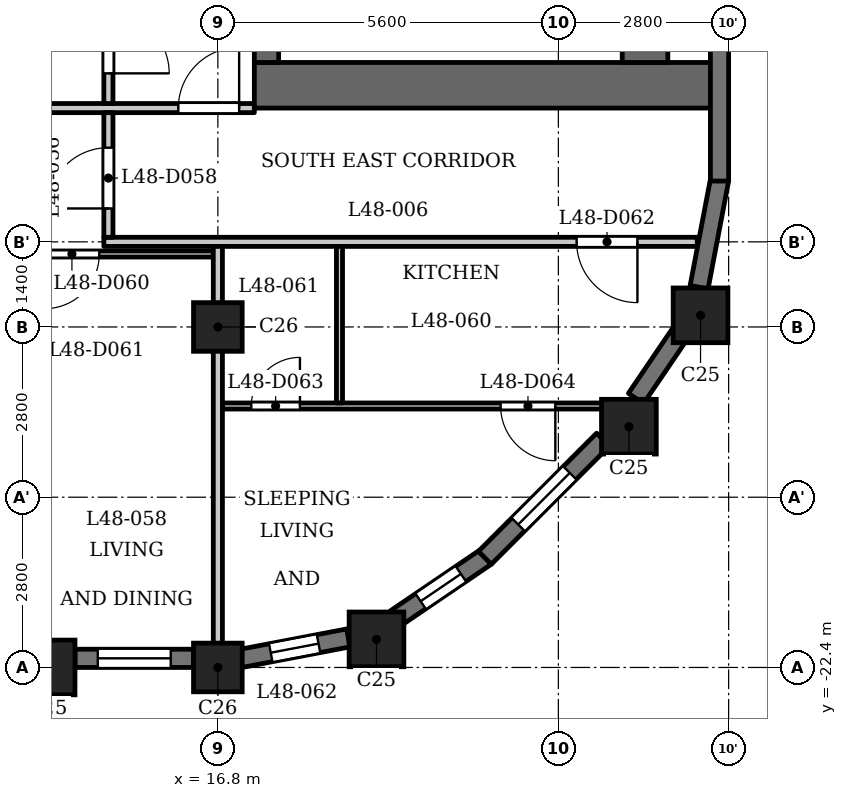
"""IFC4 building model, lengths in metres.
Left out: names, types, materials, properties, quantities, classifications, styles, units other than length and angle.
Written with IfcOpenShell. Run it as: python <this file> out.ifc"""

import sys

from ifc_helpers import new_model, si_unit, direction, frame, frame_2d, origin, origin_2d, place, context, subcontext, project, spatial, rectangle, extrude, element, fill, save


model = new_model("IFC4")
c1 = context("Model", 3, precision=1e-05, world=origin(), true_north=direction((0.0, 1.0)))
c2 = subcontext(c1, "Body", "Model", "MODEL_VIEW")
j1 = project(units=[si_unit("LENGTHUNIT", "METRE"), si_unit("PLANEANGLEUNIT", "RADIAN")], contexts=[c1])
p1 = place(None, origin())
s1 = spatial("IfcSite", under=j1, at=p1, CompositionType="ELEMENT")
p2 = place(p1, origin())
s2 = spatial("IfcBuilding", under=s1, at=p2, CompositionType="ELEMENT")
p3 = place(p2, frame((0.0, 0.0, 188.9)))
s3 = spatial("IfcBuildingStorey", under=s2, at=p3, CompositionType="ELEMENT", Elevation=188.9)
for number, where, z_axis, x_axis in (
    (1, (14.0, -22.4, 0.0), (0.0, 0.0, 1.0), (1.0, 0.0, 0.0)),
    (2, (19.409, -21.938, 0.0), (0.0, 0.0, 1.0), (1.0, 0.0, 0.0)),
    (3, (23.56, -18.44, 0.0), (0.0, 0.0, 1.0), (1.0, 0.0, 0.0)),
    (4, (24.738, -16.609, 0.0), (0.0, 0.0, 1.0), (1.0, 0.0, 0.0)),
):
    element("IfcColumn", number, at=place(p3, frame(where, z_axis=z_axis, x_axis=x_axis)), inside=s3, PredefinedType="COLUMN", context=c2, shape_type="SweptSolid", body=[
        extrude(rectangle(XDim=0.9, YDim=0.9, at=origin_2d()), origin(), (0.0, 0.0, 1.0), 3.5),
    ])
for number, where, z_axis, x_axis in (
    (5, (16.8, -22.4, 0.0), (0.0, 0.0, 1.0), (1.0, 0.0, 0.0)),
    (6, (16.8, -16.8, 0.0), (0.0, 0.0, 1.0), (1.0, 0.0, 0.0)),
):
    element("IfcColumn", number, at=place(p3, frame(where, z_axis=z_axis, x_axis=x_axis)), inside=s3, PredefinedType="COLUMN", context=c2, shape_type="SweptSolid", body=[
        extrude(rectangle(XDim=0.8, YDim=0.8, at=origin_2d()), origin(), (0.0, 0.0, 1.0), 3.5),
    ])
p4 = place(p3, frame((14.45, -22.25, 0.0), z_axis=(0.0, 0.0, 1.0), x_axis=(1.0, 0.0, 0.0)))
e7 = element("IfcWall", 7, at=p4, inside=s3, PredefinedType="SOLIDWALL", context=c2, shape_type="SweptSolid", body=[
    extrude(rectangle(XDim=1.95, YDim=0.3, at=frame_2d((0.975, 0.0))), origin(), (0.0, 0.0, 1.0), 2.5),
])
p5 = place(p4, frame((0.375, 0.0, 0.6)))
e8 = element("IfcOpeningElement", 8, at=p5, cuts=e7, PredefinedType="OPENING", context=c2, shape_type="SweptSolid", body=[
    extrude(rectangle(XDim=1.2, YDim=1.55, at=frame_2d((0.6, 0.775))), frame((0.0, 0.16, 0.0), z_axis=(0.0, -1.0, 0.0), x_axis=(1.0, 0.0, 0.0)), (0.0, 0.0, 1.0), 0.32),
])
p6 = place(p3, frame((17.179, -22.251, 0.0), z_axis=(0.0, 0.0, 1.0), x_axis=(0.98230529033, 0.187286722942, 0.0)))
e9 = element("IfcWall", 9, at=p6, inside=s3, PredefinedType="SOLIDWALL", context=c2, shape_type="SweptSolid", body=[
    extrude(rectangle(XDim=1.799, YDim=0.3, at=frame_2d((0.899, 0.0))), origin(), (0.0, 0.0, 1.0), 2.5),
])
p7 = place(p6, frame((0.5, 0.0, 0.6)))
e10 = element("IfcOpeningElement", 10, at=p7, cuts=e9, PredefinedType="OPENING", context=c2, shape_type="SweptSolid", body=[
    extrude(rectangle(XDim=0.8, YDim=1.55, at=frame_2d((0.4, 0.775))), frame((0.0, 0.16, 0.0), z_axis=(0.0, -1.0, 0.0), x_axis=(1.0, 0.0, 0.0)), (0.0, 0.0, 1.0), 0.32),
])
p8 = place(p3, frame((19.719, -21.594, 0.0), z_axis=(0.0, 0.0, 1.0), x_axis=(0.827067282455, 0.562102935673, 0.0)))
e11 = element("IfcWall", 11, at=p8, inside=s3, PredefinedType="SOLIDWALL", context=c2, shape_type="SweptSolid", body=[
    extrude(rectangle(XDim=1.806, YDim=0.3, at=frame_2d((0.903, 0.0))), origin(), (0.0, 0.0, 1.0), 2.5),
])
p9 = place(p8, frame((0.503, 0.0, 0.6)))
e12 = element("IfcOpeningElement", 12, at=p9, cuts=e11, PredefinedType="OPENING", context=c2, shape_type="SweptSolid", body=[
    extrude(rectangle(XDim=0.8, YDim=1.55, at=frame_2d((0.4, 0.775))), frame((0.0, 0.16, 0.0), z_axis=(0.0, -1.0, 0.0), x_axis=(1.0, 0.0, 0.0)), (0.0, 0.0, 1.0), 0.32),
])
p10 = place(p3, frame((21.191, -20.597, 0.0), z_axis=(0.0, 0.0, 1.0), x_axis=(0.707106781187, 0.707106781187, 0.0)))
e13 = element("IfcWall", 13, at=p10, inside=s3, PredefinedType="SOLIDWALL", context=c2, shape_type="SweptSolid", body=[
    extrude(rectangle(XDim=2.75, YDim=0.3, at=frame_2d((1.375, 0.0))), origin(), (0.0, 0.0, 1.0), 2.5),
])
p11 = place(p10, frame((0.775, 0.0, 0.6)))
e14 = element("IfcOpeningElement", 14, at=p11, cuts=e13, PredefinedType="OPENING", context=c2, shape_type="SweptSolid", body=[
    extrude(rectangle(XDim=1.2, YDim=1.55, at=frame_2d((0.6, 0.775))), frame((0.0, 0.16, 0.0), z_axis=(0.0, -1.0, 0.0), x_axis=(1.0, 0.0, 0.0)), (0.0, 0.0, 1.0), 0.32),
])
p12 = place(p3, frame((23.676, -17.975, 0.0), z_axis=(0.0, 0.0, 1.0), x_axis=(0.56200149592, 0.827136215253, 0.0)))
e15 = element("IfcWall", 15, at=p12, inside=s3, PredefinedType="SOLIDWALL", context=c2, shape_type="SweptSolid", body=[
    extrude(rectangle(XDim=1.277, YDim=0.3, at=frame_2d((0.639, 0.0))), origin(), (0.0, 0.0, 1.0), 2.5),
])
p13 = place(p3, frame((24.714, -16.146, 0.0), z_axis=(0.0, 0.0, 1.0), x_axis=(0.187348135549, 0.982293579388, 0.0)))
e16 = element("IfcWall", 16, at=p13, inside=s3, PredefinedType="SOLIDWALL", context=c2, shape_type="SweptSolid", body=[
    extrude(rectangle(XDim=1.806, YDim=0.3, at=frame_2d((0.903, 0.0))), origin(), (0.0, 0.0, 1.0), 2.5),
])
p14 = place(p3, frame((25.05, -14.4, 0.0), z_axis=(0.0, 0.0, 1.0), x_axis=(0.0, 1.0, 0.0)))
e17 = element("IfcWall", 17, at=p14, inside=s3, PredefinedType="SOLIDWALL", context=c2, shape_type="SweptSolid", body=[
    extrude(rectangle(XDim=2.75, YDim=0.3, at=frame_2d((1.375, 0.0))), origin(), (0.0, 0.0, 1.0), 2.5),
])
p15 = place(p3, frame((17.4, -12.825, 0.0), z_axis=(0.0, 0.0, 1.0), x_axis=(1.0, 0.0, 0.0)))
e18 = element("IfcWall", 18, at=p15, inside=s3, PredefinedType="SHEAR", context=c2, shape_type="SweptSolid", body=[
    extrude(rectangle(XDim=7.6, YDim=0.75, at=frame_2d((3.8, 0.0))), origin(), (0.0, 0.0, 1.0), 3.2),
])
p16 = place(p3, frame((17.6, -12.45, 0.0), z_axis=(0.0, 0.0, 1.0), x_axis=(0.0, 1.0, 0.0)))
e19 = element("IfcWall", 19, at=p16, inside=s3, PredefinedType="SHEAR", context=c2, shape_type="SweptSolid", body=[
    extrude(rectangle(XDim=24.9, YDim=0.4, at=frame_2d((12.45, 0.0))), origin(), (0.0, 0.0, 1.0), 3.2),
])
p17 = place(p16, frame((6.325, 0.0, 0.0)))
e20 = element("IfcOpeningElement", 20, at=p17, cuts=e19, PredefinedType="OPENING", context=c2, shape_type="SweptSolid", body=[
    extrude(rectangle(XDim=0.9, YDim=2.1, at=frame_2d((0.45, 1.05))), frame((0.0, 0.21, 0.0), z_axis=(0.0, -1.0, 0.0), x_axis=(1.0, 0.0, 0.0)), (0.0, 0.0, 1.0), 0.42),
])
p18 = place(p16, frame((9.925, 0.0, 0.0)))
e21 = element("IfcOpeningElement", 21, at=p18, cuts=e19, PredefinedType="OPENING", context=c2, shape_type="SweptSolid", body=[
    extrude(rectangle(XDim=0.9, YDim=2.1, at=frame_2d((0.45, 1.05))), frame((0.0, 0.21, 0.0), z_axis=(0.0, -1.0, 0.0), x_axis=(1.0, 0.0, 0.0)), (0.0, 0.0, 1.0), 0.42),
])
p19 = place(p16, frame((15.6, 0.0, 0.0)))
e22 = element("IfcOpeningElement", 22, at=p19, cuts=e19, PredefinedType="OPENING", context=c2, shape_type="SweptSolid", body=[
    extrude(rectangle(XDim=1.1, YDim=2.1, at=frame_2d((0.55, 1.05))), frame((0.0, 0.21, 0.0), z_axis=(0.0, -1.0, 0.0), x_axis=(1.0, 0.0, 0.0)), (0.0, 0.0, 1.0), 0.42),
])
p20 = place(p16, frame((18.0, 0.0, 0.0)))
e23 = element("IfcOpeningElement", 23, at=p20, cuts=e19, PredefinedType="OPENING", context=c2, shape_type="SweptSolid", body=[
    extrude(rectangle(XDim=1.1, YDim=2.1, at=frame_2d((0.55, 1.05))), frame((0.0, 0.21, 0.0), z_axis=(0.0, -1.0, 0.0), x_axis=(1.0, 0.0, 0.0)), (0.0, 0.0, 1.0), 0.42),
])
p21 = place(p16, frame((23.025, 0.0, 0.0)))
e24 = element("IfcOpeningElement", 24, at=p21, cuts=e19, PredefinedType="OPENING", context=c2, shape_type="SweptSolid", body=[
    extrude(rectangle(XDim=1.1, YDim=2.1, at=frame_2d((0.55, 1.05))), frame((0.0, 0.21, 0.0), z_axis=(0.0, -1.0, 0.0), x_axis=(1.0, 0.0, 0.0)), (0.0, 0.0, 1.0), 0.42),
])
p22 = place(p16, frame((0.775, 0.0, 0.0)))
e25 = element("IfcOpeningElement", 25, at=p22, cuts=e19, PredefinedType="OPENING", context=c2, shape_type="SweptSolid", body=[
    extrude(rectangle(XDim=1.1, YDim=2.1, at=frame_2d((0.55, 1.05))), frame((0.0, 0.21, 0.0), z_axis=(0.0, -1.0, 0.0), x_axis=(1.0, 0.0, 0.0)), (0.0, 0.0, 1.0), 0.42),
])
p23 = place(p16, frame((12.925, 0.0, 0.0)))
e26 = element("IfcOpeningElement", 26, at=p23, cuts=e19, PredefinedType="OPENING", context=c2, shape_type="SweptSolid", body=[
    extrude(rectangle(XDim=1.8, YDim=2.1, at=frame_2d((0.9, 1.05))), frame((0.0, 0.21, 0.0), z_axis=(0.0, -1.0, 0.0), x_axis=(1.0, 0.0, 0.0)), (0.0, 0.0, 1.0), 0.42),
])
p24 = place(p3, frame((23.825, -12.45, 0.0), z_axis=(0.0, 0.0, 1.0), x_axis=(0.0, 1.0, 0.0)))
e27 = element("IfcWall", 27, at=p24, inside=s3, PredefinedType="SHEAR", context=c2, shape_type="SweptSolid", body=[
    extrude(rectangle(XDim=24.9, YDim=0.75, at=frame_2d((12.45, 0.0))), origin(), (0.0, 0.0, 1.0), 3.2),
])
p25 = place(p3, frame((16.875, -18.1, 0.0), z_axis=(0.0, 0.0, 1.0), x_axis=(1.0, 0.0, 0.0)))
e28 = element("IfcWall", 28, at=p25, inside=s3, PredefinedType="PARTITIONING", context=c2, shape_type="SweptSolid", body=[
    extrude(rectangle(XDim=6.765, YDim=0.1, at=frame_2d((3.382, 0.0))), origin(), (0.0, 0.0, 1.0), 3.2),
])
p26 = place(p25, frame((0.475, 0.0, 0.0)))
e29 = element("IfcOpeningElement", 29, at=p26, cuts=e28, PredefinedType="OPENING", context=c2, shape_type="SweptSolid", body=[
    extrude(rectangle(XDim=0.8, YDim=2.1, at=frame_2d((0.4, 1.05))), frame((0.0, 0.06, 0.0), z_axis=(0.0, -1.0, 0.0), x_axis=(1.0, 0.0, 0.0)), (0.0, 0.0, 1.0), 0.12),
])
p27 = place(p25, frame((4.575, 0.0, 0.0)))
e30 = element("IfcOpeningElement", 30, at=p27, cuts=e28, PredefinedType="OPENING", context=c2, shape_type="SweptSolid", body=[
    extrude(rectangle(XDim=0.9, YDim=2.1, at=frame_2d((0.45, 1.05))), frame((0.0, 0.06, 0.0), z_axis=(0.0, -1.0, 0.0), x_axis=(1.0, 0.0, 0.0)), (0.0, 0.0, 1.0), 0.12),
])
p28 = place(p3, frame((-16.725, -15.6, 0.0), z_axis=(0.0, 0.0, 1.0), x_axis=(1.0, 0.0, 0.0)))
e31 = element("IfcWall", 31, at=p28, inside=s3, PredefinedType="PARTITIONING", context=c2, shape_type="SweptSolid", body=[
    extrude(rectangle(XDim=33.45, YDim=0.1, at=frame_2d((16.725, 0.0))), origin(), (0.0, 0.0, 1.0), 3.2),
])
p29 = place(p28, frame((4.075, 0.0, 0.0)))
e32 = element("IfcOpeningElement", 32, at=p29, cuts=e31, PredefinedType="OPENING", context=c2, shape_type="SweptSolid", body=[
    extrude(rectangle(XDim=0.8, YDim=2.1, at=frame_2d((0.4, 1.05))), frame((0.0, 0.06, 0.0), z_axis=(0.0, -1.0, 0.0), x_axis=(1.0, 0.0, 0.0)), (0.0, 0.0, 1.0), 0.12),
])
p30 = place(p28, frame((1.825, 0.0, 0.0)))
e33 = element("IfcOpeningElement", 33, at=p30, cuts=e31, PredefinedType="OPENING", context=c2, shape_type="SweptSolid", body=[
    extrude(rectangle(XDim=0.9, YDim=2.1, at=frame_2d((0.45, 1.05))), frame((0.0, 0.06, 0.0), z_axis=(0.0, -1.0, 0.0), x_axis=(1.0, 0.0, 0.0)), (0.0, 0.0, 1.0), 0.12),
])
p31 = place(p28, frame((9.675, 0.0, 0.0)))
e34 = element("IfcOpeningElement", 34, at=p31, cuts=e31, PredefinedType="OPENING", context=c2, shape_type="SweptSolid", body=[
    extrude(rectangle(XDim=0.8, YDim=2.1, at=frame_2d((0.4, 1.05))), frame((0.0, 0.06, 0.0), z_axis=(0.0, -1.0, 0.0), x_axis=(1.0, 0.0, 0.0)), (0.0, 0.0, 1.0), 0.12),
])
p32 = place(p28, frame((14.025, 0.0, 0.0)))
e35 = element("IfcOpeningElement", 35, at=p32, cuts=e31, PredefinedType="OPENING", context=c2, shape_type="SweptSolid", body=[
    extrude(rectangle(XDim=0.9, YDim=2.1, at=frame_2d((0.45, 1.05))), frame((0.0, 0.06, 0.0), z_axis=(0.0, -1.0, 0.0), x_axis=(1.0, 0.0, 0.0)), (0.0, 0.0, 1.0), 0.12),
])
p33 = place(p28, frame((20.875, 0.0, 0.0)))
e36 = element("IfcOpeningElement", 36, at=p33, cuts=e31, PredefinedType="OPENING", context=c2, shape_type="SweptSolid", body=[
    extrude(rectangle(XDim=0.8, YDim=2.1, at=frame_2d((0.4, 1.05))), frame((0.0, 0.06, 0.0), z_axis=(0.0, -1.0, 0.0), x_axis=(1.0, 0.0, 0.0)), (0.0, 0.0, 1.0), 0.12),
])
p34 = place(p28, frame((25.225, 0.0, 0.0)))
e37 = element("IfcOpeningElement", 37, at=p34, cuts=e31, PredefinedType="OPENING", context=c2, shape_type="SweptSolid", body=[
    extrude(rectangle(XDim=0.9, YDim=2.1, at=frame_2d((0.45, 1.05))), frame((0.0, 0.06, 0.0), z_axis=(0.0, -1.0, 0.0), x_axis=(1.0, 0.0, 0.0)), (0.0, 0.0, 1.0), 0.12),
])
p35 = place(p28, frame((28.475, 0.0, 0.0)))
e38 = element("IfcOpeningElement", 38, at=p35, cuts=e31, PredefinedType="OPENING", context=c2, shape_type="SweptSolid", body=[
    extrude(rectangle(XDim=0.8, YDim=2.1, at=frame_2d((0.4, 1.05))), frame((0.0, 0.06, 0.0), z_axis=(0.0, -1.0, 0.0), x_axis=(1.0, 0.0, 0.0)), (0.0, 0.0, 1.0), 0.12),
])
p36 = place(p28, frame((30.675, 0.0, 0.0)))
e39 = element("IfcOpeningElement", 39, at=p36, cuts=e31, PredefinedType="OPENING", context=c2, shape_type="SweptSolid", body=[
    extrude(rectangle(XDim=0.9, YDim=2.1, at=frame_2d((0.45, 1.05))), frame((0.0, 0.06, 0.0), z_axis=(0.0, -1.0, 0.0), x_axis=(1.0, 0.0, 0.0)), (0.0, 0.0, 1.0), 0.12),
])
p37 = place(p3, frame((14.925, -15.4, 0.0), z_axis=(0.0, 0.0, 1.0), x_axis=(1.0, 0.0, 0.0)))
e40 = element("IfcWall", 40, at=p37, inside=s3, PredefinedType="PARTITIONING", context=c2, shape_type="SweptSolid", body=[
    extrude(rectangle(XDim=9.759, YDim=0.15, at=frame_2d((4.879, 0.0))), origin(), (0.0, 0.0, 1.0), 3.2),
])
p38 = place(p37, frame((7.775, 0.0, 0.0)))
e41 = element("IfcOpeningElement", 41, at=p38, cuts=e40, PredefinedType="OPENING", context=c2, shape_type="SweptSolid", body=[
    extrude(rectangle(XDim=1.0, YDim=2.1, at=frame_2d((0.5, 1.05))), frame((0.0, 0.085, 0.0), z_axis=(0.0, -1.0, 0.0), x_axis=(1.0, 0.0, 0.0)), (0.0, 0.0, 1.0), 0.17),
])
p39 = place(p3, frame((-17.4, -13.2, 0.0), z_axis=(0.0, 0.0, 1.0), x_axis=(1.0, 0.0, 0.0)))
e42 = element("IfcWall", 42, at=p39, inside=s3, PredefinedType="PARTITIONING", context=c2, shape_type="SweptSolid", body=[
    extrude(rectangle(XDim=34.8, YDim=0.15, at=frame_2d((17.4, 0.0))), origin(), (0.0, 0.0, 1.0), 3.2),
])
p40 = place(p39, frame((0.15, 0.0, 0.0)))
e43 = element("IfcOpeningElement", 43, at=p40, cuts=e42, PredefinedType="OPENING", context=c2, shape_type="SweptSolid", body=[
    extrude(rectangle(XDim=1.0, YDim=2.1, at=frame_2d((0.5, 1.05))), frame((0.0, 0.085, 0.0), z_axis=(0.0, -1.0, 0.0), x_axis=(1.0, 0.0, 0.0)), (0.0, 0.0, 1.0), 0.17),
])
p41 = place(p39, frame((33.55, 0.0, 0.0)))
e44 = element("IfcOpeningElement", 44, at=p41, cuts=e42, PredefinedType="OPENING", context=c2, shape_type="SweptSolid", body=[
    extrude(rectangle(XDim=1.0, YDim=2.1, at=frame_2d((0.5, 1.05))), frame((0.0, 0.085, 0.0), z_axis=(0.0, -1.0, 0.0), x_axis=(1.0, 0.0, 0.0)), (0.0, 0.0, 1.0), 0.17),
])
p42 = place(p39, frame((15.7, 0.0, 0.0)))
e45 = element("IfcOpeningElement", 45, at=p42, cuts=e42, PredefinedType="OPENING", context=c2, shape_type="SweptSolid", body=[
    extrude(rectangle(XDim=1.0, YDim=2.1, at=frame_2d((0.5, 1.05))), frame((0.0, 0.085, 0.0), z_axis=(0.0, -1.0, 0.0), x_axis=(1.0, 0.0, 0.0)), (0.0, 0.0, 1.0), 0.17),
])
p43 = place(p39, frame((26.9, 0.0, 0.0)))
e46 = element("IfcOpeningElement", 46, at=p43, cuts=e42, PredefinedType="OPENING", context=c2, shape_type="SweptSolid", body=[
    extrude(rectangle(XDim=1.0, YDim=2.1, at=frame_2d((0.5, 1.05))), frame((0.0, 0.085, 0.0), z_axis=(0.0, -1.0, 0.0), x_axis=(1.0, 0.0, 0.0)), (0.0, 0.0, 1.0), 0.17),
])
p44 = place(p3, frame((15.0, -15.325, 0.0), z_axis=(0.0, 0.0, 1.0), x_axis=(0.0, 1.0, 0.0)))
e47 = element("IfcWall", 47, at=p44, inside=s3, PredefinedType="PARTITIONING", context=c2, shape_type="SweptSolid", body=[
    extrude(rectangle(XDim=2.05, YDim=0.15, at=frame_2d((1.025, 0.0))), origin(), (0.0, 0.0, 1.0), 3.2),
])
p45 = place(p44, frame((0.474, 0.0, 0.0)))
e48 = element("IfcOpeningElement", 48, at=p45, cuts=e47, PredefinedType="OPENING", context=c2, shape_type="SweptSolid", body=[
    extrude(rectangle(XDim=1.0, YDim=2.1, at=frame_2d((0.5, 1.05))), frame((0.0, 0.085, 0.0), z_axis=(0.0, -1.0, 0.0), x_axis=(1.0, 0.0, 0.0)), (0.0, 0.0, 1.0), 0.17),
])
p46 = place(p3, frame((15.0, -13.125, 0.0), z_axis=(0.0, 0.0, 1.0), x_axis=(0.0, 1.0, 0.0)))
e49 = element("IfcWall", 49, at=p46, inside=s3, PredefinedType="PARTITIONING", context=c2, shape_type="SweptSolid", body=[
    extrude(rectangle(XDim=6.356, YDim=0.15, at=frame_2d((3.178, 0.0))), origin(), (0.0, 0.0, 1.0), 3.2),
])
p47 = place(p46, frame((0.496, 0.0, 0.0)))
e50 = element("IfcOpeningElement", 50, at=p47, cuts=e49, PredefinedType="OPENING", context=c2, shape_type="SweptSolid", body=[
    extrude(rectangle(XDim=1.0, YDim=2.1, at=frame_2d((0.5, 1.05))), frame((0.0, 0.085, 0.0), z_axis=(0.0, -1.0, 0.0), x_axis=(1.0, 0.0, 0.0)), (0.0, 0.0, 1.0), 0.17),
])
p48 = place(p3, frame((16.8, -22.31, 0.0), z_axis=(0.0, 0.0, 1.0), x_axis=(0.0, 1.0, 0.0)))
e51 = element("IfcWall", 51, at=p48, inside=s3, PredefinedType="PARTITIONING", context=c2, shape_type="SweptSolid", body=[
    extrude(rectangle(XDim=6.835, YDim=0.15, at=frame_2d((3.417, 0.0))), origin(), (0.0, 0.0, 1.0), 2.55),
])
p49 = place(p3, frame((18.8, -18.05, 0.0), z_axis=(0.0, 0.0, 1.0), x_axis=(0.0, 1.0, 0.0)))
e52 = element("IfcWall", 52, at=p49, inside=s3, PredefinedType="PARTITIONING", context=c2, shape_type="SweptSolid", body=[
    extrude(rectangle(XDim=2.575, YDim=0.1, at=frame_2d((1.288, 0.0))), origin(), (0.0, 0.0, 1.0), 3.2),
])
p50 = place(p47, origin())
e53 = element("IfcDoor", 53, at=p50, inside=s3, OperationType="SINGLE_SWING_LEFT", PredefinedType="DOOR", context=c2, shape_type="SweptSolid", body=[
    extrude(rectangle(XDim=1.0, YDim=2.1, at=frame_2d((0.5, 1.05))), frame((0.0, 0.025, 0.0), z_axis=(0.0, -1.0, 0.0), x_axis=(1.0, 0.0, 0.0)), (0.0, 0.0, 1.0), 0.05),
])
fill(e50, e53)
p51 = place(p41, origin())
e54 = element("IfcDoor", 54, at=p51, inside=s3, OperationType="SINGLE_SWING_LEFT", PredefinedType="DOOR", context=c2, shape_type="SweptSolid", body=[
    extrude(rectangle(XDim=1.0, YDim=2.1, at=frame_2d((0.5, 1.05))), frame((0.0, 0.025, 0.0), z_axis=(0.0, -1.0, 0.0), x_axis=(1.0, 0.0, 0.0)), (0.0, 0.0, 1.0), 0.05),
])
fill(e44, e54)
p52 = place(p45, origin())
e55 = element("IfcDoor", 55, at=p52, inside=s3, OperationType="SINGLE_SWING_RIGHT", PredefinedType="DOOR", context=c2, shape_type="SweptSolid", body=[
    extrude(rectangle(XDim=1.0, YDim=2.1, at=frame_2d((0.5, 1.05))), frame((0.0, 0.025, 0.0), z_axis=(0.0, -1.0, 0.0), x_axis=(1.0, 0.0, 0.0)), (0.0, 0.0, 1.0), 0.05),
])
fill(e48, e55)
p53 = place(p36, origin())
e56 = element("IfcDoor", 56, at=p53, inside=s3, OperationType="SINGLE_SWING_LEFT", PredefinedType="DOOR", context=c2, shape_type="SweptSolid", body=[
    extrude(rectangle(XDim=0.9, YDim=2.1, at=frame_2d((0.45, 1.05))), frame((0.0, 0.025, 0.0), z_axis=(0.0, -1.0, 0.0), x_axis=(1.0, 0.0, 0.0)), (0.0, 0.0, 1.0), 0.05),
])
fill(e39, e56)
p54 = place(p38, origin())
e57 = element("IfcDoor", 57, at=p54, inside=s3, OperationType="SINGLE_SWING_RIGHT", PredefinedType="DOOR", context=c2, shape_type="SweptSolid", body=[
    extrude(rectangle(XDim=1.0, YDim=2.1, at=frame_2d((0.5, 1.05))), frame((0.0, 0.025, 0.0), z_axis=(0.0, -1.0, 0.0), x_axis=(1.0, 0.0, 0.0)), (0.0, 0.0, 1.0), 0.05),
])
fill(e41, e57)
p55 = place(p26, origin())
e58 = element("IfcDoor", 58, at=p55, inside=s3, OperationType="SINGLE_SWING_LEFT", PredefinedType="DOOR", context=c2, shape_type="SweptSolid", body=[
    extrude(rectangle(XDim=0.8, YDim=2.1, at=frame_2d((0.4, 1.05))), frame((0.0, 0.025, 0.0), z_axis=(0.0, -1.0, 0.0), x_axis=(1.0, 0.0, 0.0)), (0.0, 0.0, 1.0), 0.05),
])
fill(e29, e58)
p56 = place(p27, origin())
e59 = element("IfcDoor", 59, at=p56, inside=s3, OperationType="SINGLE_SWING_RIGHT", PredefinedType="DOOR", context=c2, shape_type="SweptSolid", body=[
    extrude(rectangle(XDim=0.9, YDim=2.1, at=frame_2d((0.45, 1.05))), frame((0.0, 0.025, 0.0), z_axis=(0.0, -1.0, 0.0), x_axis=(1.0, 0.0, 0.0)), (0.0, 0.0, 1.0), 0.05),
])
fill(e30, e59)
p57 = place(p5, origin())
e60 = element("IfcWindow", 60, at=p57, inside=s3, PartitioningType="SINGLE_PANEL", PredefinedType="WINDOW", context=c2, shape_type="SweptSolid", body=[
    extrude(rectangle(XDim=1.2, YDim=1.55, at=frame_2d((0.6, 0.775))), frame((0.0, 0.03, 0.0), z_axis=(0.0, -1.0, 0.0), x_axis=(1.0, 0.0, 0.0)), (0.0, 0.0, 1.0), 0.06),
])
fill(e8, e60)
p58 = place(p7, origin())
e61 = element("IfcWindow", 61, at=p58, inside=s3, PartitioningType="SINGLE_PANEL", PredefinedType="WINDOW", context=c2, shape_type="SweptSolid", body=[
    extrude(rectangle(XDim=0.8, YDim=1.55, at=frame_2d((0.4, 0.775))), frame((0.0, 0.03, 0.0), z_axis=(0.0, -1.0, 0.0), x_axis=(1.0, 0.0, 0.0)), (0.0, 0.0, 1.0), 0.06),
])
fill(e10, e61)
p59 = place(p9, origin())
e62 = element("IfcWindow", 62, at=p59, inside=s3, PartitioningType="SINGLE_PANEL", PredefinedType="WINDOW", context=c2, shape_type="SweptSolid", body=[
    extrude(rectangle(XDim=0.8, YDim=1.55, at=frame_2d((0.4, 0.775))), frame((0.0, 0.03, 0.0), z_axis=(0.0, -1.0, 0.0), x_axis=(1.0, 0.0, 0.0)), (0.0, 0.0, 1.0), 0.06),
])
fill(e12, e62)
p60 = place(p11, origin())
e63 = element("IfcWindow", 63, at=p60, inside=s3, PartitioningType="SINGLE_PANEL", PredefinedType="WINDOW", context=c2, shape_type="SweptSolid", body=[
    extrude(rectangle(XDim=1.2, YDim=1.55, at=frame_2d((0.6, 0.775))), frame((0.0, 0.03, 0.0), z_axis=(0.0, -1.0, 0.0), x_axis=(1.0, 0.0, 0.0)), (0.0, 0.0, 1.0), 0.06),
])
fill(e14, e63)
save(model, sys.argv[1])
